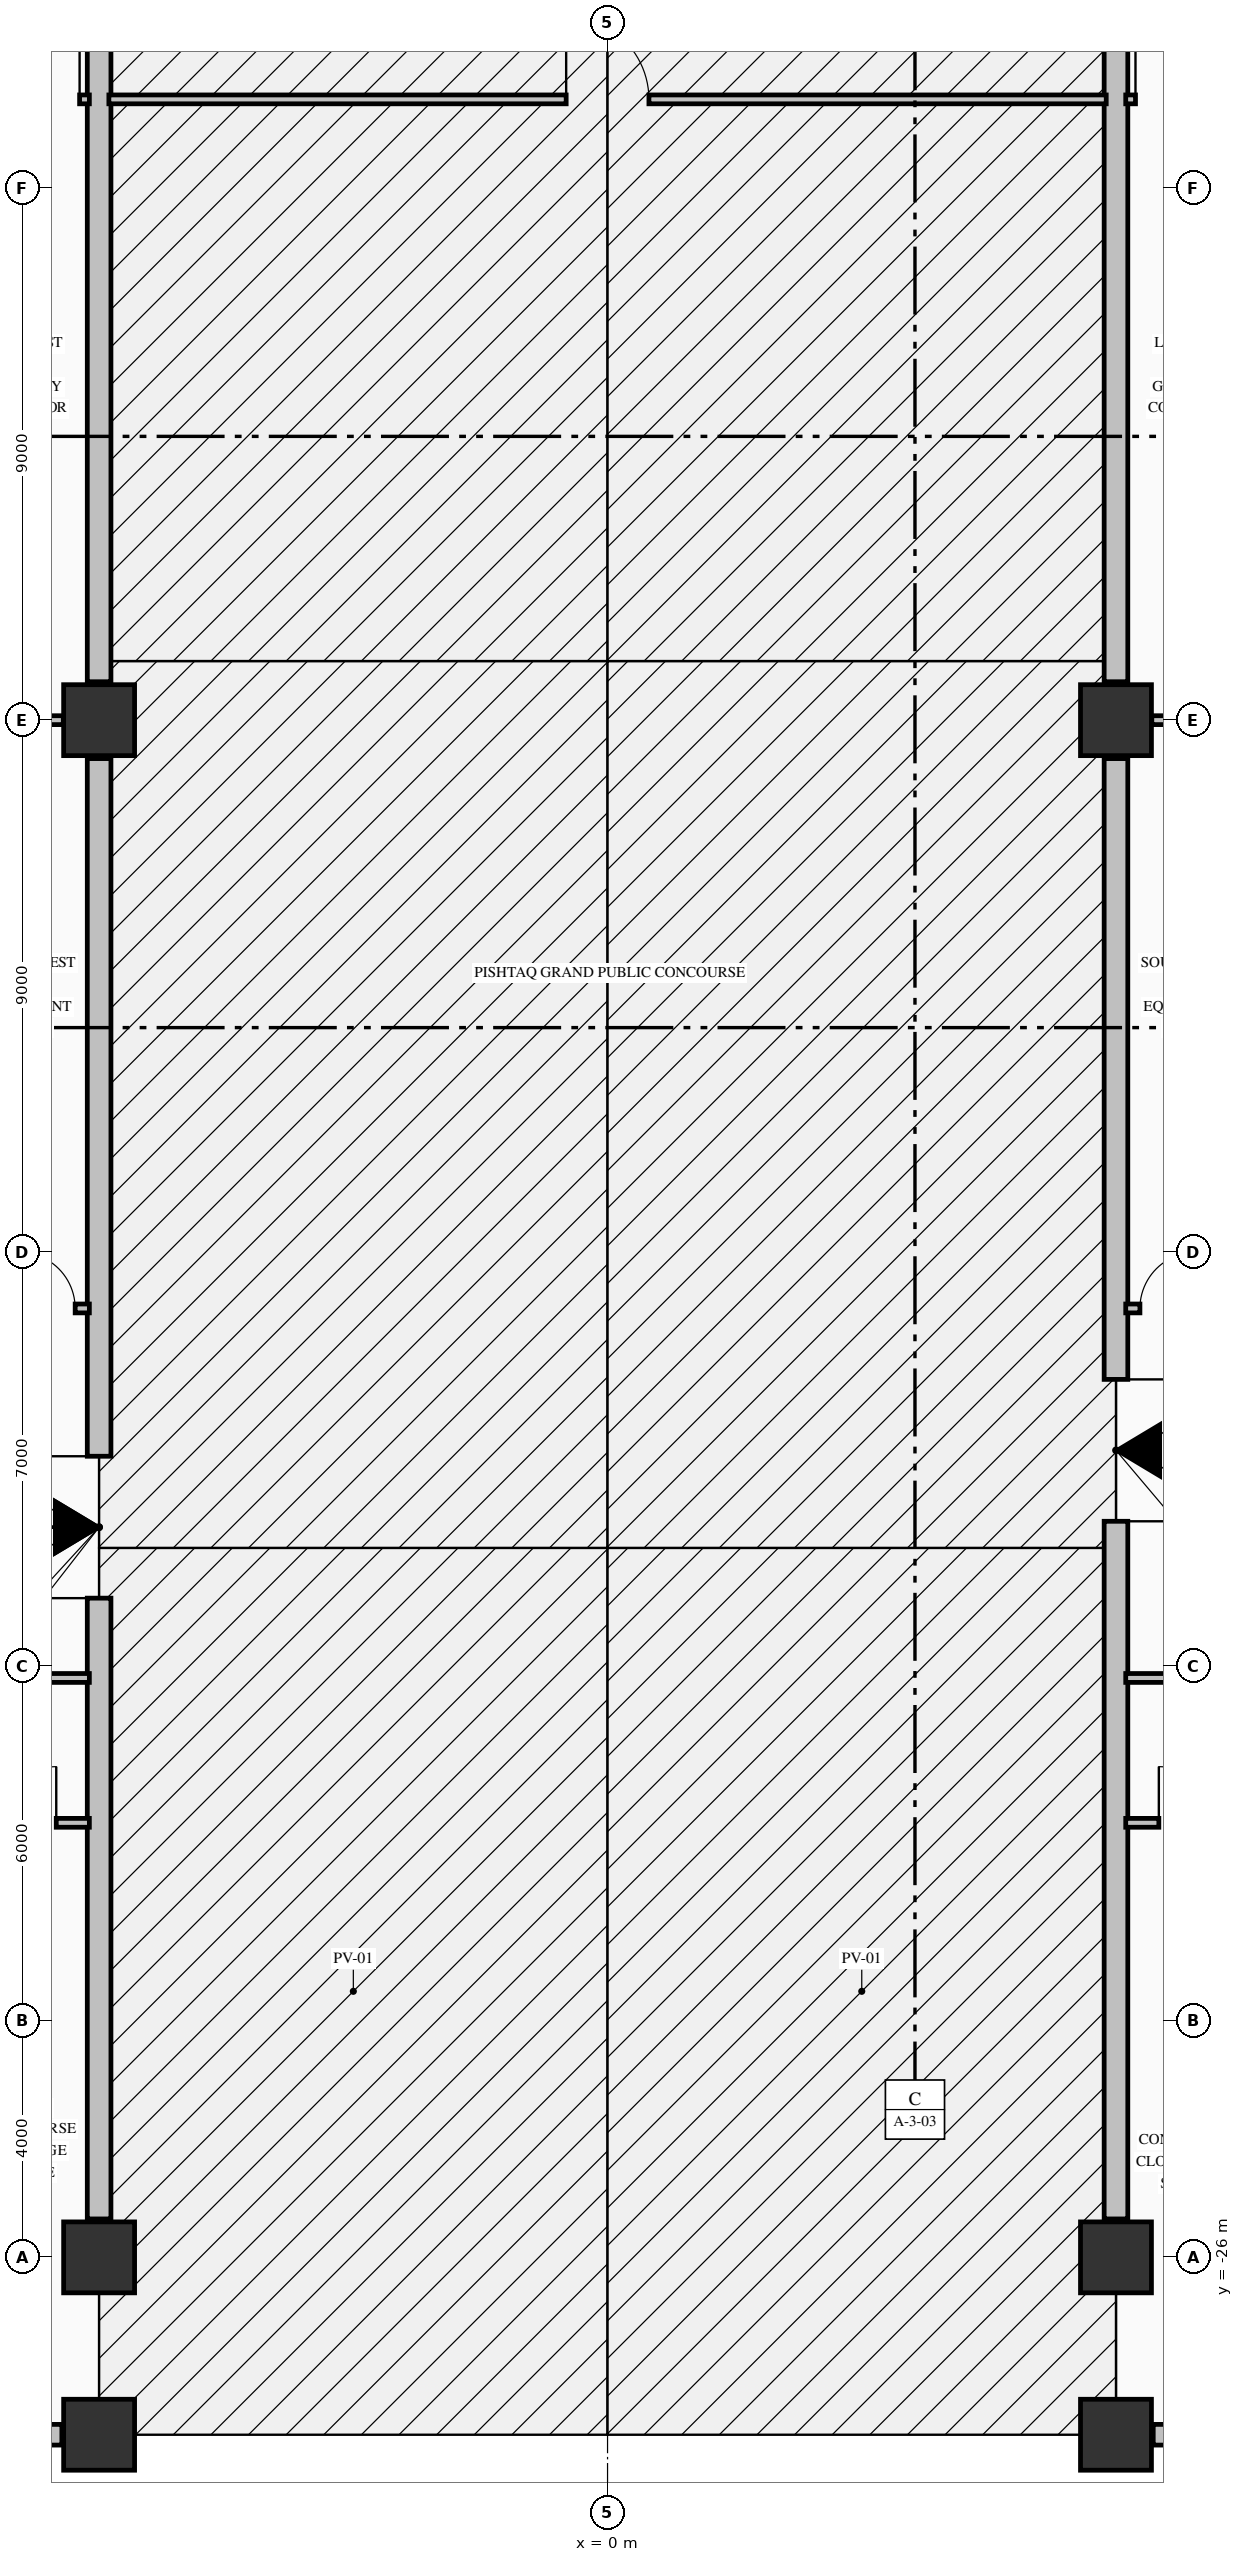
"""IFC4 building model, lengths in metres.
Left out: names, types, materials, properties, quantities, classifications, styles, units other than length and angle.
Written with IfcOpenShell. Run it as: python <this file> out.ifc"""

import sys

from ifc_helpers import new_model, si_unit, direction, frame, frame_2d, origin, origin_2d, place, context, subcontext, project, spatial, rectangle, extrude, element, fill, save


model = new_model("IFC4")
c1 = context("Model", 3, precision=1e-05, world=origin(), true_north=direction((0.0, 1.0)))
c2 = subcontext(c1, "Body", "Model", "MODEL_VIEW")
j1 = project(units=[si_unit("LENGTHUNIT", "METRE"), si_unit("PLANEANGLEUNIT", "RADIAN")], contexts=[c1])
p1 = place(None, origin())
s1 = spatial("IfcSite", under=j1, at=p1, CompositionType="ELEMENT")
p2 = place(p1, origin())
s2 = spatial("IfcBuilding", under=s1, at=p2, CompositionType="ELEMENT")
p3 = place(p2, origin())
s3 = spatial("IfcBuildingStorey", under=s2, at=p3, CompositionType="ELEMENT", Elevation=0.0)
for number, where, z_axis, x_axis in (
    (1, (-8.6, -29.0, 0.0), (0.0, 0.0, 1.0), (1.0, 0.0, 0.0)),
    (2, (8.6, -29.0, 0.0), (0.0, 0.0, 1.0), (1.0, 0.0, 0.0)),
    (3, (-8.6, -26.0, 0.0), (0.0, 0.0, 1.0), (1.0, 0.0, 0.0)),
    (4, (8.6, -26.0, 0.0), (0.0, 0.0, 1.0), (1.0, 0.0, 0.0)),
    (5, (-8.6, 0.0, 0.0), (0.0, 0.0, 1.0), (1.0, 0.0, 0.0)),
    (6, (8.6, 0.0, 0.0), (0.0, 0.0, 1.0), (1.0, 0.0, 0.0)),
):
    element("IfcColumn", number, at=place(p3, frame(where, z_axis=z_axis, x_axis=x_axis)), inside=s3, PredefinedType="COLUMN", context=c2, shape_type="SweptSolid", body=[
        extrude(rectangle(XDim=1.2, YDim=1.2, at=origin_2d()), origin(), (0.0, 0.0, 1.0), 5.09),
    ])
for number, where, z_axis, x_axis in (
    (7, (-10.17, -29.0, 0.0), (0.0, 0.0, 1.0), (1.0, 0.0, 0.0)),
    (8, (9.23, -29.0, 0.0), (0.0, 0.0, 1.0), (1.0, 0.0, 0.0)),
):
    element("IfcWall", number, at=place(p3, frame(where, z_axis=z_axis, x_axis=x_axis)), inside=s3, PredefinedType="STANDARD", context=c2, shape_type="SweptSolid", body=[
        extrude(rectangle(XDim=0.94, YDim=0.35, at=frame_2d((0.47, 0.0))), origin(), (0.0, 0.0, 1.0), 4.482),
    ])
p4 = place(p3, frame((-8.6, -25.35, 0.0), z_axis=(0.0, 0.0, 1.0), x_axis=(0.0, 1.0, 0.0)))
e9 = element("IfcWall", 9, at=p4, inside=s3, PredefinedType="STANDARD", context=c2, shape_type="SweptSolid", body=[
    extrude(rectangle(XDim=24.7, YDim=0.4, at=frame_2d((12.35, 0.0))), origin(), (0.0, 0.0, 1.0), 4.132),
])
p5 = place(p4, frame((10.5, 0.0, 0.0)))
e10 = element("IfcOpeningElement", 10, at=p5, cuts=e9, PredefinedType="OPENING", context=c2, shape_type="SweptSolid", body=[
    extrude(rectangle(XDim=2.4, YDim=2.6, at=frame_2d((1.2, 1.3))), frame((0.0, 0.21, 0.0), z_axis=(0.0, -1.0, 0.0), x_axis=(1.0, 0.0, 0.0)), (0.0, 0.0, 1.0), 0.42),
])
for number, where, z_axis, x_axis in (
    (11, (-8.6, 0.65, 0.0), (0.0, 0.0, 1.0), (0.0, 1.0, 0.0)),
    (12, (8.6, 15.35, 0.0), (0.0, 0.0, 1.0), (0.0, -1.0, 0.0)),
):
    element("IfcWall", number, at=place(p3, frame(where, z_axis=z_axis, x_axis=x_axis)), inside=s3, PredefinedType="STANDARD", context=c2, shape_type="SweptSolid", body=[
        extrude(rectangle(XDim=14.7, YDim=0.4, at=frame_2d((7.35, 0.0))), origin(), (0.0, 0.0, 1.0), 4.132),
    ])
p6 = place(p3, frame((8.6, -0.65, 0.0), z_axis=(0.0, 0.0, 1.0), x_axis=(0.0, -1.0, 0.0)))
e13 = element("IfcWall", 13, at=p6, inside=s3, PredefinedType="STANDARD", context=c2, shape_type="SweptSolid", body=[
    extrude(rectangle(XDim=24.7, YDim=0.4, at=frame_2d((12.35, 0.0))), origin(), (0.0, 0.0, 1.0), 4.132),
])
p7 = place(p6, frame((10.5, 0.0, 0.0)))
e14 = element("IfcOpeningElement", 14, at=p7, cuts=e13, PredefinedType="OPENING", context=c2, shape_type="SweptSolid", body=[
    extrude(rectangle(XDim=2.4, YDim=2.6, at=frame_2d((1.2, 1.3))), frame((0.0, 0.21, 0.0), z_axis=(0.0, -1.0, 0.0), x_axis=(1.0, 0.0, 0.0)), (0.0, 0.0, 1.0), 0.42),
])
p8 = place(p3, frame((-26.1, -18.65, 0.0), z_axis=(0.0, 0.0, 1.0), x_axis=(1.0, 0.0, 0.0)))
e15 = element("IfcWall", 15, at=p8, inside=s3, PredefinedType="PARTITIONING", context=c2, shape_type="SweptSolid", body=[
    extrude(rectangle(XDim=17.335, YDim=0.15, at=frame_2d((8.667, 0.0))), origin(), (0.0, 0.0, 1.0), 5.09),
])
p9 = place(p8, frame((2.5, 0.0, 0.0)))
e16 = element("IfcOpeningElement", 16, at=p9, cuts=e15, PredefinedType="OPENING", context=c2, shape_type="SweptSolid", body=[
    extrude(rectangle(XDim=1.2, YDim=2.15, at=frame_2d((0.6, 1.075))), frame((0.0, 0.085, 0.0), z_axis=(0.0, -1.0, 0.0), x_axis=(1.0, 0.0, 0.0)), (0.0, 0.0, 1.0), 0.17),
])
p10 = place(p8, frame((9.9, 0.0, 0.0)))
e17 = element("IfcOpeningElement", 17, at=p10, cuts=e15, PredefinedType="OPENING", context=c2, shape_type="SweptSolid", body=[
    extrude(rectangle(XDim=1.4, YDim=2.2, at=frame_2d((0.7, 1.1))), frame((0.0, 0.085, 0.0), z_axis=(0.0, -1.0, 0.0), x_axis=(1.0, 0.0, 0.0)), (0.0, 0.0, 1.0), 0.17),
])
p11 = place(p8, frame((15.825, 0.0, 0.0)))
e18 = element("IfcOpeningElement", 18, at=p11, cuts=e15, PredefinedType="OPENING", context=c2, shape_type="SweptSolid", body=[
    extrude(rectangle(XDim=0.95, YDim=2.15, at=frame_2d((0.475, 1.075))), frame((0.0, 0.085, 0.0), z_axis=(0.0, -1.0, 0.0), x_axis=(1.0, 0.0, 0.0)), (0.0, 0.0, 1.0), 0.17),
])
p12 = place(p3, frame((8.765, -18.65, 0.0), z_axis=(0.0, 0.0, 1.0), x_axis=(1.0, 0.0, 0.0)))
e19 = element("IfcWall", 19, at=p12, inside=s3, PredefinedType="PARTITIONING", context=c2, shape_type="SweptSolid", body=[
    extrude(rectangle(XDim=21.085, YDim=0.15, at=frame_2d((10.542, 0.0))), origin(), (0.0, 0.0, 1.0), 5.09),
])
p13 = place(p12, frame((0.56, 0.0, 0.0)))
e20 = element("IfcOpeningElement", 20, at=p13, cuts=e19, PredefinedType="OPENING", context=c2, shape_type="SweptSolid", body=[
    extrude(rectangle(XDim=0.95, YDim=2.15, at=frame_2d((0.475, 1.075))), frame((0.0, 0.085, 0.0), z_axis=(0.0, -1.0, 0.0), x_axis=(1.0, 0.0, 0.0)), (0.0, 0.0, 1.0), 0.17),
])
p14 = place(p12, frame((6.035, 0.0, 0.0)))
e21 = element("IfcOpeningElement", 21, at=p14, cuts=e19, PredefinedType="OPENING", context=c2, shape_type="SweptSolid", body=[
    extrude(rectangle(XDim=1.4, YDim=2.2, at=frame_2d((0.7, 1.1))), frame((0.0, 0.085, 0.0), z_axis=(0.0, -1.0, 0.0), x_axis=(1.0, 0.0, 0.0)), (0.0, 0.0, 1.0), 0.17),
])
p15 = place(p12, frame((13.635, 0.0, 0.0)))
e22 = element("IfcOpeningElement", 22, at=p15, cuts=e19, PredefinedType="OPENING", context=c2, shape_type="SweptSolid", body=[
    extrude(rectangle(XDim=1.2, YDim=2.15, at=frame_2d((0.6, 1.075))), frame((0.0, 0.085, 0.0), z_axis=(0.0, -1.0, 0.0), x_axis=(1.0, 0.0, 0.0)), (0.0, 0.0, 1.0), 0.17),
])
p16 = place(p12, frame((18.71, 0.0, 0.0)))
e23 = element("IfcOpeningElement", 23, at=p16, cuts=e19, PredefinedType="OPENING", context=c2, shape_type="SweptSolid", body=[
    extrude(rectangle(XDim=0.95, YDim=2.15, at=frame_2d((0.475, 1.075))), frame((0.0, 0.085, 0.0), z_axis=(0.0, -1.0, 0.0), x_axis=(1.0, 0.0, 0.0)), (0.0, 0.0, 1.0), 0.17),
])
for number, where, z_axis, x_axis in (
    (24, (-10.194, -16.2, 0.0), (0.0, 0.0, 1.0), (1.0, 0.0, 0.0)),
    (25, (8.765, -16.2, 0.0), (0.0, 0.0, 1.0), (1.0, 0.0, 0.0)),
):
    element("IfcWall", number, at=place(p3, frame(where, z_axis=z_axis, x_axis=x_axis)), inside=s3, PredefinedType="PARTITIONING", context=c2, shape_type="SweptSolid", body=[
        extrude(rectangle(XDim=1.429, YDim=0.15, at=frame_2d((0.715, 0.0))), origin(), (0.0, 0.0, 1.0), 5.09),
    ])
p17 = place(p3, frame((-11.0, -9.95, 0.0), z_axis=(0.0, 0.0, 1.0), x_axis=(1.0, 0.0, 0.0)))
e26 = element("IfcWall", 26, at=p17, inside=s3, PredefinedType="PARTITIONING", context=c2, shape_type="SweptSolid", body=[
    extrude(rectangle(XDim=2.235, YDim=0.15, at=frame_2d((1.118, 0.0))), origin(), (0.0, 0.0, 1.0), 5.09),
])
p18 = place(p17, frame((1.045, 0.0, 0.0)))
e27 = element("IfcOpeningElement", 27, at=p18, cuts=e26, PredefinedType="OPENING", context=c2, shape_type="SweptSolid", body=[
    extrude(rectangle(XDim=0.95, YDim=2.15, at=frame_2d((0.475, 1.075))), frame((0.0, 0.085, 0.0), z_axis=(0.0, -1.0, 0.0), x_axis=(1.0, 0.0, 0.0)), (0.0, 0.0, 1.0), 0.17),
])
p19 = place(p3, frame((8.765, -9.95, 0.0), z_axis=(0.0, 0.0, 1.0), x_axis=(1.0, 0.0, 0.0)))
e28 = element("IfcWall", 28, at=p19, inside=s3, PredefinedType="PARTITIONING", context=c2, shape_type="SweptSolid", body=[
    extrude(rectangle(XDim=2.235, YDim=0.15, at=frame_2d((1.118, 0.0))), origin(), (0.0, 0.0, 1.0), 5.09),
])
p20 = place(p19, frame((0.24, 0.0, 0.0)))
e29 = element("IfcOpeningElement", 29, at=p20, cuts=e28, PredefinedType="OPENING", context=c2, shape_type="SweptSolid", body=[
    extrude(rectangle(XDim=0.95, YDim=2.15, at=frame_2d((0.475, 1.075))), frame((0.0, 0.085, 0.0), z_axis=(0.0, -1.0, 0.0), x_axis=(1.0, 0.0, 0.0)), (0.0, 0.0, 1.0), 0.17),
])
for number, where, z_axis, x_axis in (
    (30, (-10.194, 0.0, 0.0), (0.0, 0.0, 1.0), (1.0, 0.0, 0.0)),
    (31, (9.206, 0.0, 0.0), (0.0, 0.0, 1.0), (1.0, 0.0, 0.0)),
):
    element("IfcWall", number, at=place(p3, frame(where, z_axis=z_axis, x_axis=x_axis)), inside=s3, PredefinedType="PARTITIONING", context=c2, shape_type="SweptSolid", body=[
        extrude(rectangle(XDim=0.988, YDim=0.15, at=frame_2d((0.494, 0.0))), origin(), (0.0, 0.0, 1.0), 4.132),
    ])
p21 = place(p3, frame((-11.0, 10.5, 0.0), z_axis=(0.0, 0.0, 1.0), x_axis=(1.0, 0.0, 0.0)))
e32 = element("IfcWall", 32, at=p21, inside=s3, PredefinedType="PARTITIONING", context=c2, shape_type="SweptSolid", body=[
    extrude(rectangle(XDim=2.235, YDim=0.15, at=frame_2d((1.118, 0.0))), origin(), (0.0, 0.0, 1.0), 5.09),
])
p22 = place(p21, frame((0.97, 0.0, 0.0)))
e33 = element("IfcOpeningElement", 33, at=p22, cuts=e32, PredefinedType="OPENING", context=c2, shape_type="SweptSolid", body=[
    extrude(rectangle(XDim=1.1, YDim=2.15, at=frame_2d((0.55, 1.075))), frame((0.0, 0.085, 0.0), z_axis=(0.0, -1.0, 0.0), x_axis=(1.0, 0.0, 0.0)), (0.0, 0.0, 1.0), 0.17),
])
p23 = place(p3, frame((-8.435, 10.5, 0.0), z_axis=(0.0, 0.0, 1.0), x_axis=(1.0, 0.0, 0.0)))
e34 = element("IfcWall", 34, at=p23, inside=s3, PredefinedType="PARTITIONING", context=c2, shape_type="SweptSolid", body=[
    extrude(rectangle(XDim=16.87, YDim=0.15, at=frame_2d((8.435, 0.0))), origin(), (0.0, 0.0, 1.0), 5.09),
])
p24 = place(p23, frame((7.735, 0.0, 0.0)))
e35 = element("IfcOpeningElement", 35, at=p24, cuts=e34, PredefinedType="OPENING", context=c2, shape_type="SweptSolid", body=[
    extrude(rectangle(XDim=1.4, YDim=2.2, at=frame_2d((0.7, 1.1))), frame((0.0, 0.085, 0.0), z_axis=(0.0, -1.0, 0.0), x_axis=(1.0, 0.0, 0.0)), (0.0, 0.0, 1.0), 0.17),
])
p25 = place(p3, frame((8.765, 10.5, 0.0), z_axis=(0.0, 0.0, 1.0), x_axis=(1.0, 0.0, 0.0)))
e36 = element("IfcWall", 36, at=p25, inside=s3, PredefinedType="PARTITIONING", context=c2, shape_type="SweptSolid", body=[
    extrude(rectangle(XDim=2.235, YDim=0.15, at=frame_2d((1.118, 0.0))), origin(), (0.0, 0.0, 1.0), 5.09),
])
p26 = place(p25, frame((0.165, 0.0, 0.0)))
e37 = element("IfcOpeningElement", 37, at=p26, cuts=e36, PredefinedType="OPENING", context=c2, shape_type="SweptSolid", body=[
    extrude(rectangle(XDim=1.1, YDim=2.15, at=frame_2d((0.55, 1.075))), frame((0.0, 0.085, 0.0), z_axis=(0.0, -1.0, 0.0), x_axis=(1.0, 0.0, 0.0)), (0.0, 0.0, 1.0), 0.17),
])
p27 = place(p5, origin())
e38 = element("IfcDoor", 38, at=p27, inside=s3, OperationType="DOUBLE_DOOR_DOUBLE_SWING", PredefinedType="DOOR", context=c2, shape_type="SweptSolid", body=[
    extrude(rectangle(XDim=2.4, YDim=2.6, at=frame_2d((1.2, 1.3))), frame((0.0, 0.025, 0.0), z_axis=(0.0, -1.0, 0.0), x_axis=(1.0, 0.0, 0.0)), (0.0, 0.0, 1.0), 0.05),
])
fill(e10, e38)
p28 = place(p7, origin())
e39 = element("IfcDoor", 39, at=p28, inside=s3, OperationType="DOUBLE_DOOR_DOUBLE_SWING", PredefinedType="DOOR", context=c2, shape_type="SweptSolid", body=[
    extrude(rectangle(XDim=2.4, YDim=2.6, at=frame_2d((1.2, 1.3))), frame((0.0, 0.025, 0.0), z_axis=(0.0, -1.0, 0.0), x_axis=(1.0, 0.0, 0.0)), (0.0, 0.0, 1.0), 0.05),
])
fill(e14, e39)
p29 = place(p18, origin())
e40 = element("IfcDoor", 40, at=p29, inside=s3, OperationType="SINGLE_SWING_LEFT", PredefinedType="DOOR", context=c2, shape_type="SweptSolid", body=[
    extrude(rectangle(XDim=0.95, YDim=2.15, at=frame_2d((0.475, 1.075))), frame((0.0, 0.025, 0.0), z_axis=(0.0, -1.0, 0.0), x_axis=(1.0, 0.0, 0.0)), (0.0, 0.0, 1.0), 0.05),
])
fill(e27, e40)
p30 = place(p20, origin())
e41 = element("IfcDoor", 41, at=p30, inside=s3, OperationType="SINGLE_SWING_RIGHT", PredefinedType="DOOR", context=c2, shape_type="SweptSolid", body=[
    extrude(rectangle(XDim=0.95, YDim=2.15, at=frame_2d((0.475, 1.075))), frame((0.0, 0.025, 0.0), z_axis=(0.0, -1.0, 0.0), x_axis=(1.0, 0.0, 0.0)), (0.0, 0.0, 1.0), 0.05),
])
fill(e29, e41)
p31 = place(p22, origin())
e42 = element("IfcDoor", 42, at=p31, inside=s3, OperationType="SINGLE_SWING_RIGHT", PredefinedType="DOOR", context=c2, shape_type="SweptSolid", body=[
    extrude(rectangle(XDim=1.1, YDim=2.15, at=frame_2d((0.55, 1.075))), frame((0.0, 0.025, 0.0), z_axis=(0.0, -1.0, 0.0), x_axis=(1.0, 0.0, 0.0)), (0.0, 0.0, 1.0), 0.05),
])
fill(e33, e42)
p32 = place(p26, origin())
e43 = element("IfcDoor", 43, at=p32, inside=s3, OperationType="SINGLE_SWING_LEFT", PredefinedType="DOOR", context=c2, shape_type="SweptSolid", body=[
    extrude(rectangle(XDim=1.1, YDim=2.15, at=frame_2d((0.55, 1.075))), frame((0.0, 0.025, 0.0), z_axis=(0.0, -1.0, 0.0), x_axis=(1.0, 0.0, 0.0)), (0.0, 0.0, 1.0), 0.05),
])
fill(e37, e43)
p33 = place(p24, origin())
e44 = element("IfcDoor", 44, at=p33, inside=s3, OperationType="SINGLE_SWING_LEFT", PredefinedType="DOOR", context=c2, shape_type="SweptSolid", body=[
    extrude(rectangle(XDim=1.4, YDim=2.2, at=frame_2d((0.7, 1.1))), frame((0.0, 0.025, 0.0), z_axis=(0.0, -1.0, 0.0), x_axis=(1.0, 0.0, 0.0)), (0.0, 0.0, 1.0), 0.05),
])
fill(e35, e44)
p34 = place(p11, origin())
e45 = element("IfcDoor", 45, at=p34, inside=s3, OperationType="SINGLE_SWING_RIGHT", PredefinedType="DOOR", context=c2, shape_type="SweptSolid", body=[
    extrude(rectangle(XDim=0.95, YDim=2.15, at=frame_2d((0.475, 1.075))), frame((0.0, 0.025, 0.0), z_axis=(0.0, -1.0, 0.0), x_axis=(1.0, 0.0, 0.0)), (0.0, 0.0, 1.0), 0.05),
])
fill(e18, e45)
p35 = place(p13, origin())
e46 = element("IfcDoor", 46, at=p35, inside=s3, OperationType="SINGLE_SWING_LEFT", PredefinedType="DOOR", context=c2, shape_type="SweptSolid", body=[
    extrude(rectangle(XDim=0.95, YDim=2.15, at=frame_2d((0.475, 1.075))), frame((0.0, 0.025, 0.0), z_axis=(0.0, -1.0, 0.0), x_axis=(1.0, 0.0, 0.0)), (0.0, 0.0, 1.0), 0.05),
])
fill(e20, e46)
save(model, sys.argv[1])
